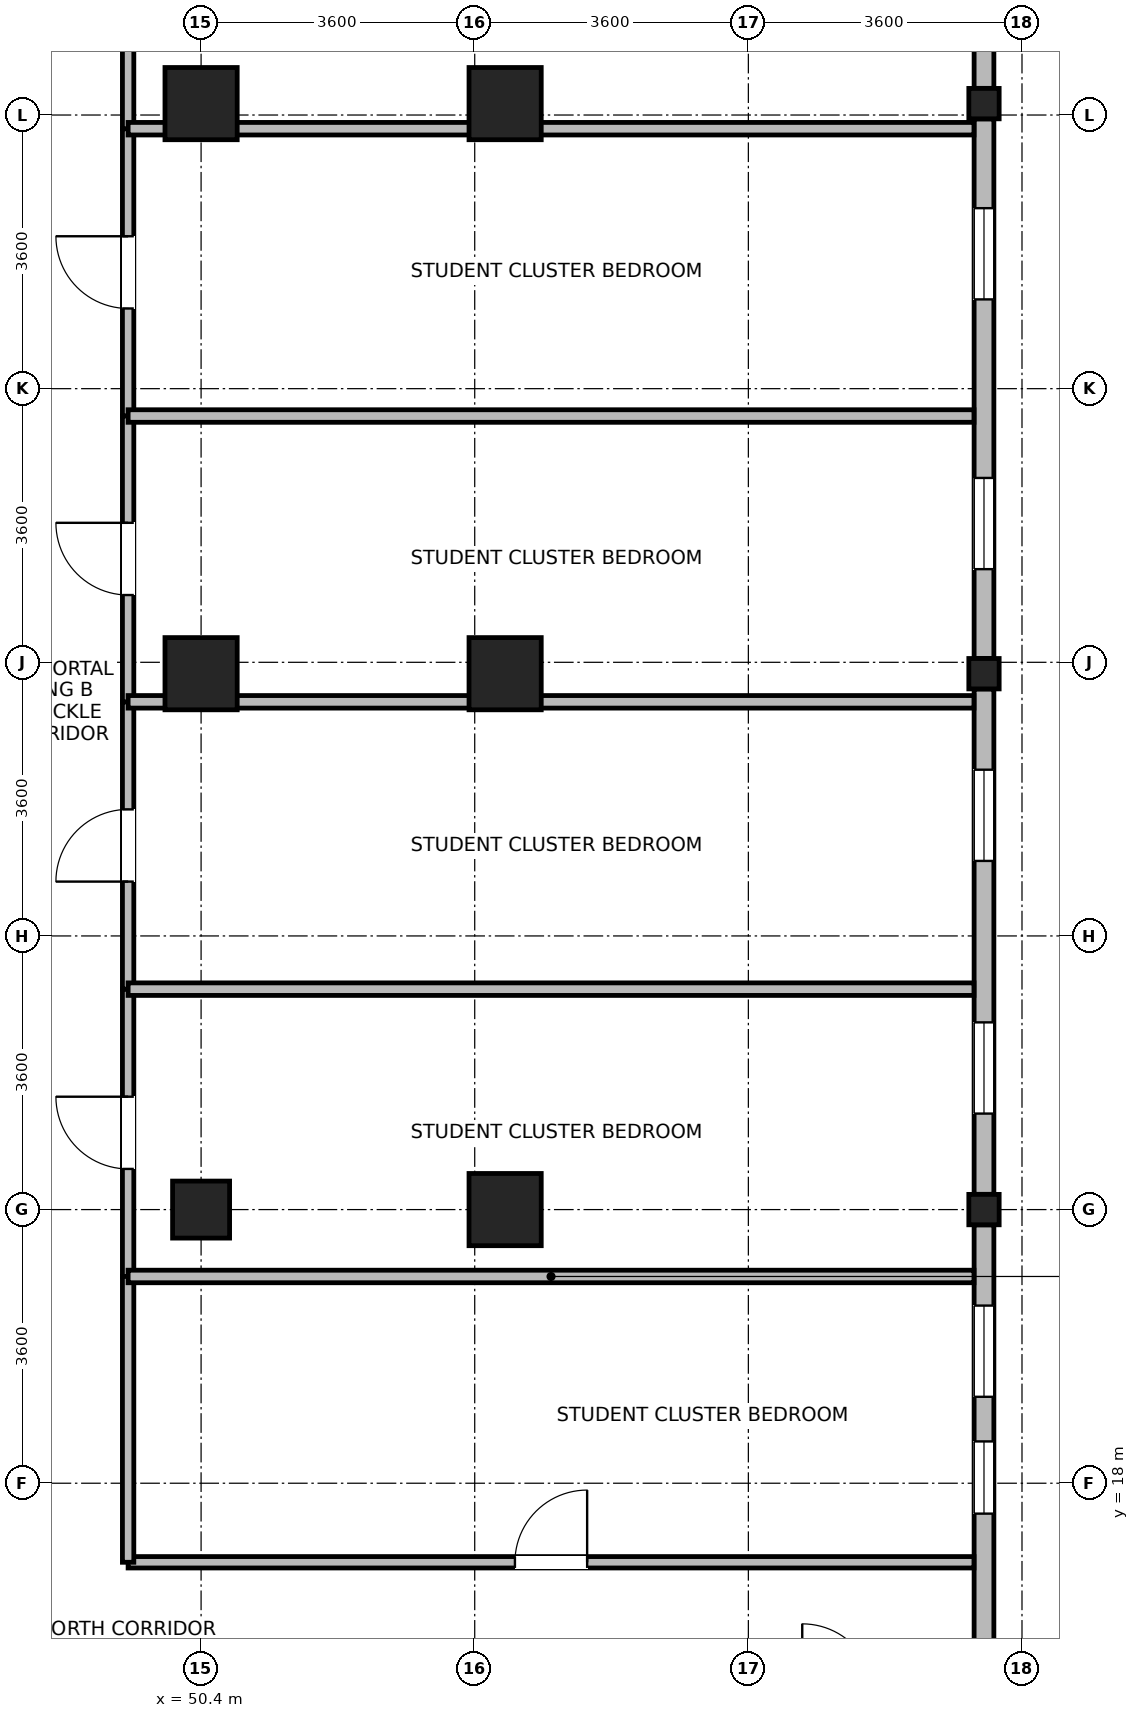
"""IFC4 building model, lengths in metres.
Left out: names, types, materials, properties, quantities, classifications, styles, units other than length and angle.
Written with IfcOpenShell. Run it as: python <this file> out.ifc"""

import sys

from ifc_helpers import new_model, si_unit, direction, frame, frame_2d, origin, origin_2d, place, context, subcontext, project, spatial, rectangle, i_section, extrude, source, transform, mapped, element, fill, save


model = new_model("IFC4")
c1 = context("Model", 3, precision=1e-05, world=origin(), true_north=direction((0.0, 1.0)))
c2 = subcontext(c1, "Body", "Model", "MODEL_VIEW")
j1 = project(units=[si_unit("LENGTHUNIT", "METRE"), si_unit("PLANEANGLEUNIT", "RADIAN")], contexts=[c1])
p1 = place(None, origin())
s1 = spatial("IfcSite", under=j1, at=p1, CompositionType="ELEMENT")
p2 = place(p1, origin())
s2 = spatial("IfcBuilding", under=s1, at=p2, CompositionType="ELEMENT")
p3 = place(p2, frame((0.0, 0.0, 242.5)))
s3 = spatial("IfcBuildingStorey", under=s2, at=p3, CompositionType="ELEMENT", Elevation=242.5)
m1 = source(origin(), c2, "Body", "SweptSolid", [
    extrude(rectangle(XDim=0.75, YDim=0.75, at=origin_2d()), origin(), (0.0, 0.0, 1.0), 3.7),
])
p4 = place(p3, frame((50.4, 21.6, 0.0), z_axis=(0.0, 0.0, 1.0), x_axis=(1.0, 0.0, 0.0)))
e1 = element("IfcColumn", 1, at=p4, inside=s3, PredefinedType="PILASTER", context=c2, shape_type="MappedRepresentation", body=[
    mapped(m1, transform((0.0, 0.0, 0.0), x_axis=(1.0, 0.0, 0.0), y_axis=(0.0, 1.0, 0.0), z_axis=(0.0, 0.0, 1.0), scale=1.0)),
])
m2 = source(origin(), c2, "Body", "SweptSolid", [
    extrude(rectangle(XDim=0.95, YDim=0.95, at=origin_2d()), origin(), (0.0, 0.0, 1.0), 3.7),
])
for number, where, z_axis, x_axis in (
    (2, (50.4, 28.65, 0.0), (0.0, 0.0, 1.0), (1.0, 0.0, 0.0)),
    (3, (50.4, 36.15, 0.0), (0.0, 0.0, 1.0), (1.0, 0.0, 0.0)),
    (4, (54.4, 21.6, 0.0), (0.0, 0.0, 1.0), (1.0, 0.0, 0.0)),
    (5, (54.4, 28.65, 0.0), (0.0, 0.0, 1.0), (1.0, 0.0, 0.0)),
    (6, (54.4, 36.15, 0.0), (0.0, 0.0, 1.0), (1.0, 0.0, 0.0)),
):
    element("IfcColumn", number, at=place(p3, frame(where, z_axis=z_axis, x_axis=x_axis)), inside=s3, PredefinedType="COLUMN", context=c2, shape_type="MappedRepresentation", body=[
        mapped(m2, transform((0.0, 0.0, 0.0), x_axis=(1.0, 0.0, 0.0), y_axis=(0.0, 1.0, 0.0), z_axis=(0.0, 0.0, 1.0), scale=1.0)),
    ])
m3 = source(origin(), c2, "Body", "SweptSolid", [
    extrude(i_section(OverallWidth=0.399, OverallDepth=0.4, WebThickness=0.017, FlangeThickness=0.023, FilletRadius=0.015, at=origin_2d()), origin(), (0.0, 0.0, 1.0), 3.7),
])
for number, where, z_axis, x_axis in (
    (7, (60.7, 21.6, 0.0), (0.0, 0.0, 1.0), (1.0, 0.0, 0.0)),
    (8, (60.7, 28.65, 0.0), (0.0, 0.0, 1.0), (1.0, 0.0, 0.0)),
    (9, (60.7, 36.15, 0.0), (0.0, 0.0, 1.0), (1.0, 0.0, 0.0)),
):
    element("IfcColumn", number, at=place(p3, frame(where, z_axis=z_axis, x_axis=x_axis)), inside=s3, PredefinedType="COLUMN", context=c2, shape_type="MappedRepresentation", body=[
        mapped(m3, transform((0.0, 0.0, 0.0), x_axis=(1.0, 0.0, 0.0), y_axis=(0.0, 1.0, 0.0), z_axis=(0.0, 0.0, 1.0), scale=1.0)),
    ])
p5 = place(p3, frame((60.7, 21.399, 0.0), z_axis=(0.0, 0.0, 1.0), x_axis=(0.0, -1.0, 0.0)))
e10 = element("IfcWall", 10, at=p5, inside=s3, PredefinedType="STANDARD", context=c2, shape_type="SweptSolid", body=[
    extrude(rectangle(XDim=6.648, YDim=0.26, at=frame_2d((3.324, 0.0))), origin(), (0.0, 0.0, 1.0), 3.02),
])
p6 = place(p5, frame((1.062, 0.0, 0.85)))
e11 = element("IfcOpeningElement", 11, at=p6, cuts=e10, PredefinedType="OPENING", context=c2, shape_type="SweptSolid", body=[
    extrude(rectangle(XDim=1.2, YDim=1.75, at=frame_2d((0.6, 0.875))), frame((0.0, 0.14, 0.0), z_axis=(0.0, -1.0, 0.0), x_axis=(1.0, 0.0, 0.0)), (0.0, 0.0, 1.0), 0.28),
])
p7 = place(p5, frame((2.849, 0.0, 0.85)))
e12 = element("IfcOpeningElement", 12, at=p7, cuts=e10, PredefinedType="OPENING", context=c2, shape_type="SweptSolid", body=[
    extrude(rectangle(XDim=0.95, YDim=1.75, at=frame_2d((0.475, 0.875))), frame((0.0, 0.14, 0.0), z_axis=(0.0, -1.0, 0.0), x_axis=(1.0, 0.0, 0.0)), (0.0, 0.0, 1.0), 0.28),
])
p8 = place(p3, frame((60.7, 28.449, 0.0), z_axis=(0.0, 0.0, 1.0), x_axis=(0.0, -1.0, 0.0)))
e13 = element("IfcWall", 13, at=p8, inside=s3, PredefinedType="STANDARD", context=c2, shape_type="SweptSolid", body=[
    extrude(rectangle(XDim=6.648, YDim=0.26, at=frame_2d((3.324, 0.0))), origin(), (0.0, 0.0, 1.0), 3.02),
])
p9 = place(p8, frame((1.062, 0.0, 0.85)))
e14 = element("IfcOpeningElement", 14, at=p9, cuts=e13, PredefinedType="OPENING", context=c2, shape_type="SweptSolid", body=[
    extrude(rectangle(XDim=1.2, YDim=1.75, at=frame_2d((0.6, 0.875))), frame((0.0, 0.14, 0.0), z_axis=(0.0, -1.0, 0.0), x_axis=(1.0, 0.0, 0.0)), (0.0, 0.0, 1.0), 0.28),
])
p10 = place(p8, frame((4.386, 0.0, 0.85)))
e15 = element("IfcOpeningElement", 15, at=p10, cuts=e13, PredefinedType="OPENING", context=c2, shape_type="SweptSolid", body=[
    extrude(rectangle(XDim=1.2, YDim=1.75, at=frame_2d((0.6, 0.875))), frame((0.0, 0.14, 0.0), z_axis=(0.0, -1.0, 0.0), x_axis=(1.0, 0.0, 0.0)), (0.0, 0.0, 1.0), 0.28),
])
p11 = place(p3, frame((60.7, 35.949, 0.0), z_axis=(0.0, 0.0, 1.0), x_axis=(0.0, -1.0, 0.0)))
e16 = element("IfcWall", 16, at=p11, inside=s3, PredefinedType="STANDARD", context=c2, shape_type="SweptSolid", body=[
    extrude(rectangle(XDim=7.098, YDim=0.26, at=frame_2d((3.549, 0.0))), origin(), (0.0, 0.0, 1.0), 3.02),
])
p12 = place(p11, frame((1.175, 0.0, 0.85)))
e17 = element("IfcOpeningElement", 17, at=p12, cuts=e16, PredefinedType="OPENING", context=c2, shape_type="SweptSolid", body=[
    extrude(rectangle(XDim=1.2, YDim=1.75, at=frame_2d((0.6, 0.875))), frame((0.0, 0.14, 0.0), z_axis=(0.0, -1.0, 0.0), x_axis=(1.0, 0.0, 0.0)), (0.0, 0.0, 1.0), 0.28),
])
p13 = place(p11, frame((4.723, 0.0, 0.85)))
e18 = element("IfcOpeningElement", 18, at=p13, cuts=e16, PredefinedType="OPENING", context=c2, shape_type="SweptSolid", body=[
    extrude(rectangle(XDim=1.2, YDim=1.75, at=frame_2d((0.6, 0.875))), frame((0.0, 0.14, 0.0), z_axis=(0.0, -1.0, 0.0), x_axis=(1.0, 0.0, 0.0)), (0.0, 0.0, 1.0), 0.28),
])
p14 = place(p3, frame((60.7, 39.73, 0.0), z_axis=(0.0, 0.0, 1.0), x_axis=(0.0, -1.0, 0.0)))
e19 = element("IfcWall", 19, at=p14, inside=s3, PredefinedType="STANDARD", context=c2, shape_type="SweptSolid", body=[
    extrude(rectangle(XDim=3.379, YDim=0.26, at=frame_2d((1.689, 0.0))), origin(), (0.0, 0.0, 1.0), 3.42),
])
p15 = place(p14, frame((1.09, 0.0, 0.85)))
e20 = element("IfcOpeningElement", 20, at=p15, cuts=e19, PredefinedType="OPENING", context=c2, shape_type="SweptSolid", body=[
    extrude(rectangle(XDim=1.2, YDim=1.75, at=frame_2d((0.6, 0.875))), frame((0.0, 0.14, 0.0), z_axis=(0.0, -1.0, 0.0), x_axis=(1.0, 0.0, 0.0)), (0.0, 0.0, 1.0), 0.28),
])
p16 = place(p3, frame((49.44, 16.96, 0.0), z_axis=(0.0, 0.0, 1.0), x_axis=(1.0, 0.0, 0.0)))
e21 = element("IfcWall", 21, at=p16, inside=s3, PredefinedType="PARTITIONING", context=c2, shape_type="SweptSolid", body=[
    extrude(rectangle(XDim=11.128, YDim=0.15, at=frame_2d((5.564, 0.0))), origin(), (0.0, 0.0, 1.0), 3.42),
])
p17 = place(p16, frame((5.089, 0.0, 0.0)))
e22 = element("IfcOpeningElement", 22, at=p17, cuts=e21, PredefinedType="OPENING", context=c2, shape_type="SweptSolid", body=[
    extrude(rectangle(XDim=0.95, YDim=2.1, at=frame_2d((0.475, 1.05))), frame((0.0, 0.085, 0.0), z_axis=(0.0, -1.0, 0.0), x_axis=(1.0, 0.0, 0.0)), (0.0, 0.0, 1.0), 0.17),
])
p18 = place(p3, frame((49.44, 20.72, 0.0), z_axis=(0.0, 0.0, 1.0), x_axis=(0.0, 1.0, 0.0)))
e23 = element("IfcWall", 23, at=p18, inside=s3, PredefinedType="PARTITIONING", context=c2, shape_type="SweptSolid", body=[
    extrude(rectangle(XDim=3.78, YDim=0.15, at=frame_2d((1.89, 0.0))), origin(), (0.0, 0.0, 1.0), 3.42),
])
p19 = place(p18, frame((1.415, 0.0, 0.0)))
e24 = element("IfcOpeningElement", 24, at=p19, cuts=e23, PredefinedType="OPENING", context=c2, shape_type="SweptSolid", body=[
    extrude(rectangle(XDim=0.95, YDim=2.1, at=frame_2d((0.475, 1.05))), frame((0.0, 0.085, 0.0), z_axis=(0.0, -1.0, 0.0), x_axis=(1.0, 0.0, 0.0)), (0.0, 0.0, 1.0), 0.17),
])
p20 = place(p3, frame((49.44, 24.5, 0.0), z_axis=(0.0, 0.0, 1.0), x_axis=(0.0, 1.0, 0.0)))
e25 = element("IfcWall", 25, at=p20, inside=s3, PredefinedType="PARTITIONING", context=c2, shape_type="SweptSolid", body=[
    extrude(rectangle(XDim=3.78, YDim=0.15, at=frame_2d((1.89, 0.0))), origin(), (0.0, 0.0, 1.0), 3.42),
])
p21 = place(p20, frame((1.415, 0.0, 0.0)))
e26 = element("IfcOpeningElement", 26, at=p21, cuts=e25, PredefinedType="OPENING", context=c2, shape_type="SweptSolid", body=[
    extrude(rectangle(XDim=0.95, YDim=2.1, at=frame_2d((0.475, 1.05))), frame((0.0, 0.085, 0.0), z_axis=(0.0, -1.0, 0.0), x_axis=(1.0, 0.0, 0.0)), (0.0, 0.0, 1.0), 0.17),
])
p22 = place(p3, frame((49.44, 32.04, 0.0), z_axis=(0.0, 0.0, 1.0), x_axis=(0.0, 1.0, 0.0)))
e27 = element("IfcWall", 27, at=p22, inside=s3, PredefinedType="PARTITIONING", context=c2, shape_type="SweptSolid", body=[
    extrude(rectangle(XDim=3.78, YDim=0.15, at=frame_2d((1.89, 0.0))), origin(), (0.0, 0.0, 1.0), 3.42),
])
p23 = place(p22, frame((1.415, 0.0, 0.0)))
e28 = element("IfcOpeningElement", 28, at=p23, cuts=e27, PredefinedType="OPENING", context=c2, shape_type="SweptSolid", body=[
    extrude(rectangle(XDim=0.95, YDim=2.1, at=frame_2d((0.475, 1.05))), frame((0.0, 0.085, 0.0), z_axis=(0.0, -1.0, 0.0), x_axis=(1.0, 0.0, 0.0)), (0.0, 0.0, 1.0), 0.17),
])
p24 = place(p3, frame((49.44, 35.82, 0.0), z_axis=(0.0, 0.0, 1.0), x_axis=(0.0, 1.0, 0.0)))
e29 = element("IfcWall", 29, at=p24, inside=s3, PredefinedType="PARTITIONING", context=c2, shape_type="SweptSolid", body=[
    extrude(rectangle(XDim=3.78, YDim=0.15, at=frame_2d((1.89, 0.0))), origin(), (0.0, 0.0, 1.0), 3.42),
])
p25 = place(p24, frame((1.415, 0.0, 0.0)))
e30 = element("IfcOpeningElement", 30, at=p25, cuts=e29, PredefinedType="OPENING", context=c2, shape_type="SweptSolid", body=[
    extrude(rectangle(XDim=0.95, YDim=2.1, at=frame_2d((0.475, 1.05))), frame((0.0, 0.085, 0.0), z_axis=(0.0, -1.0, 0.0), x_axis=(1.0, 0.0, 0.0)), (0.0, 0.0, 1.0), 0.17),
])
p26 = place(p3, frame((49.44, 16.96, 0.0), z_axis=(0.0, 0.0, 1.0), x_axis=(0.0, 1.0, 0.0)))
e31 = element("IfcWall", 31, at=p26, inside=s3, PredefinedType="PARTITIONING", context=c2, shape_type="SweptSolid", body=[
    extrude(rectangle(XDim=3.76, YDim=0.15, at=frame_2d((1.88, 0.0))), origin(), (0.0, 0.0, 1.0), 3.42),
])
p27 = place(p3, frame((49.44, 28.28, 0.0), z_axis=(0.0, 0.0, 1.0), x_axis=(0.0, 1.0, 0.0)))
e32 = element("IfcWall", 32, at=p27, inside=s3, PredefinedType="PARTITIONING", context=c2, shape_type="SweptSolid", body=[
    extrude(rectangle(XDim=3.76, YDim=0.15, at=frame_2d((1.88, 0.0))), origin(), (0.0, 0.0, 1.0), 3.42),
])
p28 = place(p27, frame((1.405, 0.0, 0.0)))
e33 = element("IfcOpeningElement", 33, at=p28, cuts=e32, PredefinedType="OPENING", context=c2, shape_type="SweptSolid", body=[
    extrude(rectangle(XDim=0.95, YDim=2.1, at=frame_2d((0.475, 1.05))), frame((0.0, 0.085, 0.0), z_axis=(0.0, -1.0, 0.0), x_axis=(1.0, 0.0, 0.0)), (0.0, 0.0, 1.0), 0.17),
])
for number, where, z_axis, x_axis in (
    (34, (49.44, 20.72, 0.0), (0.0, 0.0, 1.0), (1.0, 0.0, 0.0)),
    (35, (49.44, 24.5, 0.0), (0.0, 0.0, 1.0), (1.0, 0.0, 0.0)),
    (36, (49.44, 28.28, 0.0), (0.0, 0.0, 1.0), (1.0, 0.0, 0.0)),
    (37, (49.44, 32.04, 0.0), (0.0, 0.0, 1.0), (1.0, 0.0, 0.0)),
    (38, (49.44, 35.82, 0.0), (0.0, 0.0, 1.0), (1.0, 0.0, 0.0)),
):
    element("IfcWall", number, at=place(p3, frame(where, z_axis=z_axis, x_axis=x_axis)), inside=s3, PredefinedType="PARTITIONING", context=c2, shape_type="SweptSolid", body=[
        extrude(rectangle(XDim=11.128, YDim=0.165, at=frame_2d((5.564, 0.0))), origin(), (0.0, 0.0, 1.0), 3.42),
    ])
p29 = place(p6, origin())
e39 = element("IfcWindow", 39, at=p29, inside=s3, PartitioningType="SINGLE_PANEL", PredefinedType="WINDOW", context=c2, shape_type="SweptSolid", body=[
    extrude(rectangle(XDim=1.2, YDim=1.75, at=frame_2d((0.6, 0.875))), frame((0.0, 0.03, 0.0), z_axis=(0.0, -1.0, 0.0), x_axis=(1.0, 0.0, 0.0)), (0.0, 0.0, 1.0), 0.06),
])
fill(e11, e39)
p30 = place(p7, origin())
e40 = element("IfcWindow", 40, at=p30, inside=s3, PartitioningType="SINGLE_PANEL", PredefinedType="WINDOW", context=c2, shape_type="SweptSolid", body=[
    extrude(rectangle(XDim=0.95, YDim=1.75, at=frame_2d((0.475, 0.875))), frame((0.0, 0.03, 0.0), z_axis=(0.0, -1.0, 0.0), x_axis=(1.0, 0.0, 0.0)), (0.0, 0.0, 1.0), 0.06),
])
fill(e12, e40)
p31 = place(p9, origin())
e41 = element("IfcWindow", 41, at=p31, inside=s3, PartitioningType="SINGLE_PANEL", PredefinedType="WINDOW", context=c2, shape_type="SweptSolid", body=[
    extrude(rectangle(XDim=1.2, YDim=1.75, at=frame_2d((0.6, 0.875))), frame((0.0, 0.03, 0.0), z_axis=(0.0, -1.0, 0.0), x_axis=(1.0, 0.0, 0.0)), (0.0, 0.0, 1.0), 0.06),
])
fill(e14, e41)
p32 = place(p10, origin())
e42 = element("IfcWindow", 42, at=p32, inside=s3, PartitioningType="SINGLE_PANEL", PredefinedType="WINDOW", context=c2, shape_type="SweptSolid", body=[
    extrude(rectangle(XDim=1.2, YDim=1.75, at=frame_2d((0.6, 0.875))), frame((0.0, 0.03, 0.0), z_axis=(0.0, -1.0, 0.0), x_axis=(1.0, 0.0, 0.0)), (0.0, 0.0, 1.0), 0.06),
])
fill(e15, e42)
p33 = place(p12, origin())
e43 = element("IfcWindow", 43, at=p33, inside=s3, PartitioningType="SINGLE_PANEL", PredefinedType="WINDOW", context=c2, shape_type="SweptSolid", body=[
    extrude(rectangle(XDim=1.2, YDim=1.75, at=frame_2d((0.6, 0.875))), frame((0.0, 0.03, 0.0), z_axis=(0.0, -1.0, 0.0), x_axis=(1.0, 0.0, 0.0)), (0.0, 0.0, 1.0), 0.06),
])
fill(e17, e43)
p34 = place(p13, origin())
e44 = element("IfcWindow", 44, at=p34, inside=s3, PartitioningType="SINGLE_PANEL", PredefinedType="WINDOW", context=c2, shape_type="SweptSolid", body=[
    extrude(rectangle(XDim=1.2, YDim=1.75, at=frame_2d((0.6, 0.875))), frame((0.0, 0.03, 0.0), z_axis=(0.0, -1.0, 0.0), x_axis=(1.0, 0.0, 0.0)), (0.0, 0.0, 1.0), 0.06),
])
fill(e18, e44)
p35 = place(p17, origin())
e45 = element("IfcDoor", 45, at=p35, inside=s3, OperationType="SINGLE_SWING_RIGHT", PredefinedType="DOOR", context=c2, shape_type="SweptSolid", body=[
    extrude(rectangle(XDim=0.95, YDim=2.1, at=frame_2d((0.475, 1.05))), frame((0.0, 0.025, 0.0), z_axis=(0.0, -1.0, 0.0), x_axis=(1.0, 0.0, 0.0)), (0.0, 0.0, 1.0), 0.05),
])
fill(e22, e45)
p36 = place(p19, origin())
e46 = element("IfcDoor", 46, at=p36, inside=s3, OperationType="SINGLE_SWING_RIGHT", PredefinedType="DOOR", context=c2, shape_type="SweptSolid", body=[
    extrude(rectangle(XDim=0.95, YDim=2.1, at=frame_2d((0.475, 1.05))), frame((0.0, 0.025, 0.0), z_axis=(0.0, -1.0, 0.0), x_axis=(1.0, 0.0, 0.0)), (0.0, 0.0, 1.0), 0.05),
])
fill(e24, e46)
p37 = place(p21, origin())
e47 = element("IfcDoor", 47, at=p37, inside=s3, OperationType="SINGLE_SWING_LEFT", PredefinedType="DOOR", context=c2, shape_type="SweptSolid", body=[
    extrude(rectangle(XDim=0.95, YDim=2.1, at=frame_2d((0.475, 1.05))), frame((0.0, 0.025, 0.0), z_axis=(0.0, -1.0, 0.0), x_axis=(1.0, 0.0, 0.0)), (0.0, 0.0, 1.0), 0.05),
])
fill(e26, e47)
p38 = place(p23, origin())
e48 = element("IfcDoor", 48, at=p38, inside=s3, OperationType="SINGLE_SWING_RIGHT", PredefinedType="DOOR", context=c2, shape_type="SweptSolid", body=[
    extrude(rectangle(XDim=0.95, YDim=2.1, at=frame_2d((0.475, 1.05))), frame((0.0, 0.025, 0.0), z_axis=(0.0, -1.0, 0.0), x_axis=(1.0, 0.0, 0.0)), (0.0, 0.0, 1.0), 0.05),
])
fill(e28, e48)
p39 = place(p28, origin())
e49 = element("IfcDoor", 49, at=p39, inside=s3, OperationType="SINGLE_SWING_RIGHT", PredefinedType="DOOR", context=c2, shape_type="SweptSolid", body=[
    extrude(rectangle(XDim=0.95, YDim=2.1, at=frame_2d((0.475, 1.05))), frame((0.0, 0.025, 0.0), z_axis=(0.0, -1.0, 0.0), x_axis=(1.0, 0.0, 0.0)), (0.0, 0.0, 1.0), 0.05),
])
fill(e33, e49)
save(model, sys.argv[1])
